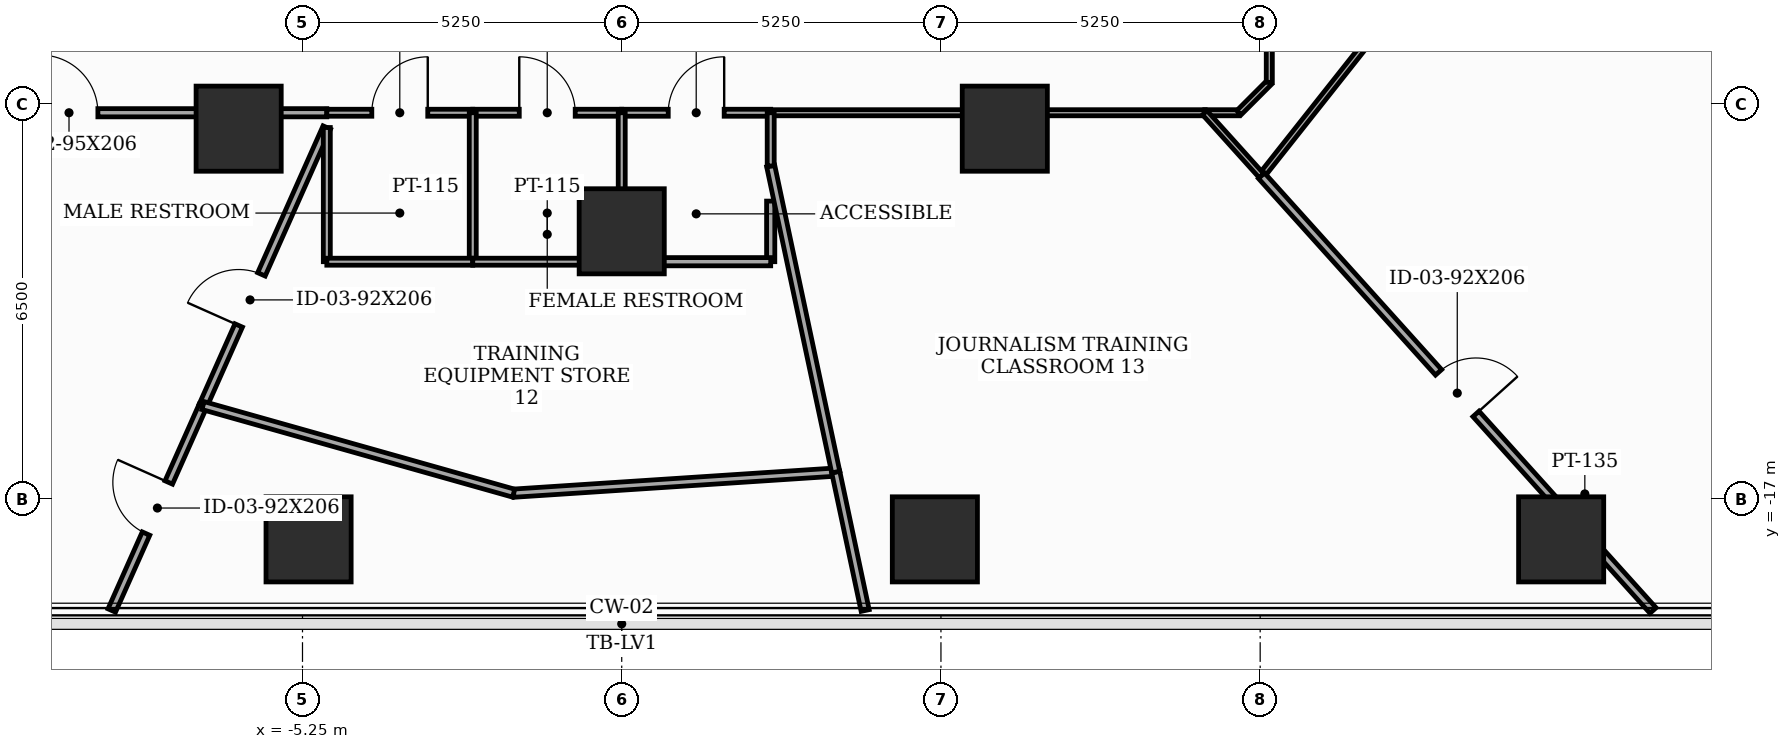
"""IFC4 building model, lengths in metres.
Left out: names, types, materials, properties, quantities, classifications, styles, units other than length and angle.
Written with IfcOpenShell. Run it as: python <this file> out.ifc"""

import sys

from ifc_helpers import new_model, si_unit, direction, frame, frame_2d, origin, origin_2d, place, context, subcontext, project, spatial, rectangle, extrude, element, fill, save


model = new_model("IFC4")
c1 = context("Model", 3, precision=1e-05, world=origin(), true_north=direction((0.0, 1.0)))
c2 = subcontext(c1, "Body", "Model", "MODEL_VIEW")
j1 = project(units=[si_unit("LENGTHUNIT", "METRE"), si_unit("PLANEANGLEUNIT", "RADIAN")], contexts=[c1])
p1 = place(None, origin())
s1 = spatial("IfcSite", under=j1, at=p1, CompositionType="ELEMENT")
p2 = place(p1, origin())
s2 = spatial("IfcBuilding", under=s1, at=p2, CompositionType="ELEMENT")
p3 = place(p2, frame((0.0, 0.0, 51.9)))
s3 = spatial("IfcBuildingStorey", under=s2, at=p3, CompositionType="ELEMENT", Elevation=51.9)
for number, where, z_axis, x_axis in (
    (1, (-6.3, -10.912, 0.0), (0.0, 0.0, 1.0), (1.0, 0.0, 0.0)),
    (2, (0.0, -12.6, 0.0), (0.0, 0.0, 1.0), (1.0, 0.0, 0.0)),
    (3, (6.3, -10.912, 0.0), (0.0, 0.0, 1.0), (1.0, 0.0, 0.0)),
    (4, (-5.15, -17.667, 0.0), (0.0, 0.0, 1.0), (1.0, 0.0, 0.0)),
    (5, (5.15, -17.667, 0.0), (0.0, 0.0, 1.0), (1.0, 0.0, 0.0)),
    (6, (15.45, -17.667, 0.0), (0.0, 0.0, 1.0), (1.0, 0.0, 0.0)),
):
    element("IfcColumn", number, at=place(p3, frame(where, z_axis=z_axis, x_axis=x_axis)), inside=s3, PredefinedType="COLUMN", context=c2, shape_type="SweptSolid", body=[
        extrude(rectangle(XDim=1.4, YDim=1.4, at=origin_2d()), origin(), (0.0, 0.0, 1.0), 3.7),
    ])
p4 = place(p3, frame((9.589, -10.65, 0.0), z_axis=(0.0, 0.0, 1.0), x_axis=(1.0, 0.0, 0.0)))
e7 = element("IfcWall", 7, at=p4, inside=s3, PredefinedType="MOVABLE", context=c2, shape_type="SweptSolid", body=[
    extrude(rectangle(XDim=0.561, YDim=0.1, at=frame_2d((0.28, 0.0))), origin(), (0.0, 0.0, 1.0), 3.5),
])
p5 = place(p3, frame((10.15, -10.65, 0.0), z_axis=(0.0, 0.0, 1.0), x_axis=(0.707106781187, 0.707106781187, 0.0)))
e8 = element("IfcWall", 8, at=p5, inside=s3, PredefinedType="MOVABLE", context=c2, shape_type="SweptSolid", body=[
    extrude(rectangle(XDim=0.707, YDim=0.1, at=frame_2d((0.354, 0.0))), origin(), (0.0, 0.0, 1.0), 2.085),
])
p6 = place(p3, frame((10.65, -10.15, 0.0), z_axis=(0.0, 0.0, 1.0), x_axis=(0.0, 1.0, 0.0)))
e9 = element("IfcWall", 9, at=p6, inside=s3, PredefinedType="MOVABLE", context=c2, shape_type="SweptSolid", body=[
    extrude(rectangle(XDim=6.158, YDim=0.1, at=frame_2d((3.079, 0.0))), origin(), (0.0, 0.0, 1.0), 2.085),
])
p7 = place(p6, frame((0.757, 0.0, 0.0)))
e10 = element("IfcOpeningElement", 10, at=p7, cuts=e9, PredefinedType="OPENING", context=c2, shape_type="SweptSolid", body=[
    extrude(rectangle(XDim=0.95, YDim=2.035, at=frame_2d((0.475, 1.018))), frame((0.0, 0.06, 0.0), z_axis=(0.0, -1.0, 0.0), x_axis=(1.0, 0.0, 0.0)), (0.0, 0.0, 1.0), 0.12),
])
p8 = place(p3, frame((-10.15, -10.65, 0.0), z_axis=(0.0, 0.0, 1.0), x_axis=(1.0, 0.0, 0.0)))
e11 = element("IfcWall", 11, at=p8, inside=s3, PredefinedType="PARTITIONING", context=c2, shape_type="SweptSolid", body=[
    extrude(rectangle(XDim=5.3, YDim=0.135, at=frame_2d((2.65, 0.0))), origin(), (0.0, 0.0, 1.0), 2.085),
])
p9 = place(p8, frame((0.585, 0.0, 0.0)))
e12 = element("IfcOpeningElement", 12, at=p9, cuts=e11, PredefinedType="OPENING", context=c2, shape_type="SweptSolid", body=[
    extrude(rectangle(XDim=0.95, YDim=2.035, at=frame_2d((0.475, 1.018))), frame((0.0, 0.077, 0.0), z_axis=(0.0, -1.0, 0.0), x_axis=(1.0, 0.0, 0.0)), (0.0, 0.0, 1.0), 0.155),
])
p10 = place(p3, frame((-4.85, -10.65, 0.0), z_axis=(0.0, 0.0, 1.0), x_axis=(1.0, 0.0, 0.0)))
e13 = element("IfcWall", 13, at=p10, inside=s3, PredefinedType="PARTITIONING", context=c2, shape_type="SweptSolid", body=[
    extrude(rectangle(XDim=2.4, YDim=0.115, at=frame_2d((1.2, 0.0))), origin(), (0.0, 0.0, 1.0), 3.5),
])
p11 = place(p10, frame((0.74, 0.0, 0.0)))
e14 = element("IfcOpeningElement", 14, at=p11, cuts=e13, PredefinedType="OPENING", context=c2, shape_type="SweptSolid", body=[
    extrude(rectangle(XDim=0.92, YDim=2.1, at=frame_2d((0.46, 1.05))), frame((0.0, 0.067, 0.0), z_axis=(0.0, -1.0, 0.0), x_axis=(1.0, 0.0, 0.0)), (0.0, 0.0, 1.0), 0.135),
])
p12 = place(p3, frame((-2.45, -10.65, 0.0), z_axis=(0.0, 0.0, 1.0), x_axis=(1.0, 0.0, 0.0)))
e15 = element("IfcWall", 15, at=p12, inside=s3, PredefinedType="PARTITIONING", context=c2, shape_type="SweptSolid", body=[
    extrude(rectangle(XDim=2.45, YDim=0.115, at=frame_2d((1.225, 0.0))), origin(), (0.0, 0.0, 1.0), 2.785),
])
p13 = place(p12, frame((0.765, 0.0, 0.0)))
e16 = element("IfcOpeningElement", 16, at=p13, cuts=e15, PredefinedType="OPENING", context=c2, shape_type="SweptSolid", body=[
    extrude(rectangle(XDim=0.92, YDim=2.1, at=frame_2d((0.46, 1.05))), frame((0.0, 0.067, 0.0), z_axis=(0.0, -1.0, 0.0), x_axis=(1.0, 0.0, 0.0)), (0.0, 0.0, 1.0), 0.135),
])
p14 = place(p3, frame((0.0, -10.65, 0.0), z_axis=(0.0, 0.0, 1.0), x_axis=(1.0, 0.0, 0.0)))
e17 = element("IfcWall", 17, at=p14, inside=s3, PredefinedType="PARTITIONING", context=c2, shape_type="SweptSolid", body=[
    extrude(rectangle(XDim=2.45, YDim=0.115, at=frame_2d((1.225, 0.0))), origin(), (0.0, 0.0, 1.0), 3.5),
])
p15 = place(p14, frame((0.765, 0.0, 0.0)))
e18 = element("IfcOpeningElement", 18, at=p15, cuts=e17, PredefinedType="OPENING", context=c2, shape_type="SweptSolid", body=[
    extrude(rectangle(XDim=0.92, YDim=2.1, at=frame_2d((0.46, 1.05))), frame((0.0, 0.067, 0.0), z_axis=(0.0, -1.0, 0.0), x_axis=(1.0, 0.0, 0.0)), (0.0, 0.0, 1.0), 0.135),
])
p16 = place(p3, frame((2.45, -10.65, 0.0), z_axis=(0.0, 0.0, 1.0), x_axis=(1.0, 0.0, 0.0)))
e19 = element("IfcWall", 19, at=p16, inside=s3, PredefinedType="MOVABLE", context=c2, shape_type="SweptSolid", body=[
    extrude(rectangle(XDim=7.139, YDim=0.1, at=frame_2d((3.57, 0.0))), origin(), (0.0, 0.0, 1.0), 2.085),
])
p17 = place(p3, frame((10.522, -11.686, 0.0), z_axis=(0.0, 0.0, 1.0), x_axis=(0.620628051287, 0.784105108997, 0.0)))
e20 = element("IfcWall", 20, at=p17, inside=s3, PredefinedType="MOVABLE", context=c2, shape_type="SweptSolid", body=[
    extrude(rectangle(XDim=5.678, YDim=0.1, at=frame_2d((2.839, 0.0))), origin(), (0.0, 0.0, 1.0), 2.085),
])
p18 = place(p3, frame((9.589, -10.65, 0.0), z_axis=(0.0, 0.0, 1.0), x_axis=(0.669100165698, -0.743172233243, 0.0)))
e21 = element("IfcWall", 21, at=p18, inside=s3, PredefinedType="MOVABLE", context=c2, shape_type="SweptSolid", body=[
    extrude(rectangle(XDim=1.394, YDim=0.1, at=frame_2d((0.697, 0.0))), origin(), (0.0, 0.0, 1.0), 3.5),
])
p19 = place(p3, frame((10.522, -11.686, 0.0), z_axis=(0.0, 0.0, 1.0), x_axis=(0.669132925935, -0.743142736915, 0.0)))
e22 = element("IfcWall", 22, at=p19, inside=s3, PredefinedType="PARTITIONING", context=c2, shape_type="SweptSolid", body=[
    extrude(rectangle(XDim=9.623, YDim=0.135, at=frame_2d((4.811, 0.0))), origin(), (0.0, 0.0, 1.0), 2.085),
])
p20 = place(p19, frame((4.351, 0.0, 0.0)))
e23 = element("IfcOpeningElement", 23, at=p20, cuts=e22, PredefinedType="OPENING", context=c2, shape_type="SweptSolid", body=[
    extrude(rectangle(XDim=0.92, YDim=2.035, at=frame_2d((0.46, 1.018))), frame((0.0, 0.077, 0.0), z_axis=(0.0, -1.0, 0.0), x_axis=(1.0, 0.0, 0.0)), (0.0, 0.0, 1.0), 0.155),
])
p21 = place(p3, frame((-8.387, -18.837, 0.0), z_axis=(0.0, 0.0, 1.0), x_axis=(0.406721597958, 0.913552156012, 0.0)))
e24 = element("IfcWall", 24, at=p21, inside=s3, PredefinedType="PARTITIONING", context=c2, shape_type="SweptSolid", body=[
    extrude(rectangle(XDim=3.69, YDim=0.135, at=frame_2d((1.845, 0.0))), origin(), (0.0, 0.0, 1.0), 2.085),
])
p22 = place(p21, frame((1.385, 0.0, 0.0)))
e25 = element("IfcOpeningElement", 25, at=p22, cuts=e24, PredefinedType="OPENING", context=c2, shape_type="SweptSolid", body=[
    extrude(rectangle(XDim=0.92, YDim=2.035, at=frame_2d((0.46, 1.018))), frame((0.0, 0.077, 0.0), z_axis=(0.0, -1.0, 0.0), x_axis=(1.0, 0.0, 0.0)), (0.0, 0.0, 1.0), 0.155),
])
p23 = place(p3, frame((-6.886, -15.466, 0.0), z_axis=(0.0, 0.0, 1.0), x_axis=(0.406713095633, 0.913555941276, 0.0)))
e26 = element("IfcWall", 26, at=p23, inside=s3, PredefinedType="PARTITIONING", context=c2, shape_type="SweptSolid", body=[
    extrude(rectangle(XDim=5.006, YDim=0.135, at=frame_2d((2.503, 0.0))), origin(), (0.0, 0.0, 1.0), 2.085),
])
p24 = place(p23, frame((1.442, 0.0, 0.0)))
e27 = element("IfcOpeningElement", 27, at=p24, cuts=e26, PredefinedType="OPENING", context=c2, shape_type="SweptSolid", body=[
    extrude(rectangle(XDim=0.92, YDim=2.035, at=frame_2d((0.46, 1.018))), frame((0.0, 0.077, 0.0), z_axis=(0.0, -1.0, 0.0), x_axis=(1.0, 0.0, 0.0)), (0.0, 0.0, 1.0), 0.155),
])
p25 = place(p3, frame((-2.45, -13.1, 0.0), z_axis=(0.0, 0.0, 1.0), x_axis=(0.0, 1.0, 0.0)))
e28 = element("IfcWall", 28, at=p25, inside=s3, PredefinedType="PARTITIONING", context=c2, shape_type="SweptSolid", body=[
    extrude(rectangle(XDim=2.45, YDim=0.115, at=frame_2d((1.225, 0.0))), origin(), (0.0, 0.0, 1.0), 2.785),
])
p26 = place(p3, frame((-4.85, -10.893, 0.0), z_axis=(0.0, 0.0, 1.0), x_axis=(0.0, -1.0, 0.0)))
e29 = element("IfcWall", 29, at=p26, inside=s3, PredefinedType="PARTITIONING", context=c2, shape_type="SweptSolid", body=[
    extrude(rectangle(XDim=2.207, YDim=0.115, at=frame_2d((1.104, 0.0))), origin(), (0.0, 0.0, 1.0), 2.085),
])
p27 = place(p3, frame((-4.85, -13.1, 0.0), z_axis=(0.0, 0.0, 1.0), x_axis=(1.0, 0.0, 0.0)))
e30 = element("IfcWall", 30, at=p27, inside=s3, PredefinedType="PARTITIONING", context=c2, shape_type="SweptSolid", body=[
    extrude(rectangle(XDim=2.4, YDim=0.115, at=frame_2d((1.2, 0.0))), origin(), (0.0, 0.0, 1.0), 2.085),
])
p28 = place(p3, frame((3.52, -16.56, 0.0), z_axis=(0.0, 0.0, 1.0), x_axis=(-0.99786221316, -0.065352915375, 0.0)))
e31 = element("IfcWall", 31, at=p28, inside=s3, PredefinedType="PARTITIONING", context=c2, shape_type="SweptSolid", body=[
    extrude(rectangle(XDim=5.308, YDim=0.135, at=frame_2d((2.654, 0.0))), origin(), (0.0, 0.0, 1.0), 2.085),
])
p29 = place(p3, frame((-1.777, -16.907, 0.0), z_axis=(0.0, 0.0, 1.0), x_axis=(-0.962452140865, 0.271451425757, 0.0)))
e32 = element("IfcWall", 32, at=p29, inside=s3, PredefinedType="PARTITIONING", context=c2, shape_type="SweptSolid", body=[
    extrude(rectangle(XDim=5.308, YDim=0.135, at=frame_2d((2.654, 0.0))), origin(), (0.0, 0.0, 1.0), 2.085),
])
p30 = place(p3, frame((4.003, -18.837, 0.0), z_axis=(0.0, 0.0, 1.0), x_axis=(-0.207680617925, 0.978196688268, 0.0)))
e33 = element("IfcWall", 33, at=p30, inside=s3, PredefinedType="PARTITIONING", context=c2, shape_type="SweptSolid", body=[
    extrude(rectangle(XDim=2.328, YDim=0.135, at=frame_2d((1.164, 0.0))), origin(), (0.0, 0.0, 1.0), 2.085),
])
p31 = place(p3, frame((-2.45, -13.1, 0.0), z_axis=(0.0, 0.0, 1.0), x_axis=(1.0, 0.0, 0.0)))
e34 = element("IfcWall", 34, at=p31, inside=s3, PredefinedType="PARTITIONING", context=c2, shape_type="SweptSolid", body=[
    extrude(rectangle(XDim=2.45, YDim=0.115, at=frame_2d((1.225, 0.0))), origin(), (0.0, 0.0, 1.0), 2.085),
])
p32 = place(p3, frame((0.0, -13.1, 0.0), z_axis=(0.0, 0.0, 1.0), x_axis=(0.0, 1.0, 0.0)))
e35 = element("IfcWall", 35, at=p32, inside=s3, PredefinedType="PARTITIONING", context=c2, shape_type="SweptSolid", body=[
    extrude(rectangle(XDim=2.45, YDim=0.115, at=frame_2d((1.225, 0.0))), origin(), (0.0, 0.0, 1.0), 2.085),
])
p33 = place(p3, frame((2.45, -12.103, 0.0), z_axis=(0.0, 0.0, 1.0), x_axis=(0.0, -1.0, 0.0)))
e36 = element("IfcWall", 36, at=p33, inside=s3, PredefinedType="PARTITIONING", context=c2, shape_type="SweptSolid", body=[
    extrude(rectangle(XDim=0.997, YDim=0.135, at=frame_2d((0.499, 0.0))), origin(), (0.0, 0.0, 1.0), 2.785),
])
p34 = place(p3, frame((2.45, -13.1, 0.0), z_axis=(0.0, 0.0, 1.0), x_axis=(-1.0, 0.0, 0.0)))
e37 = element("IfcWall", 37, at=p34, inside=s3, PredefinedType="PARTITIONING", context=c2, shape_type="SweptSolid", body=[
    extrude(rectangle(XDim=2.45, YDim=0.135, at=frame_2d((1.225, 0.0))), origin(), (0.0, 0.0, 1.0), 2.085),
])
p35 = place(p3, frame((3.52, -16.56, 0.0), z_axis=(0.0, 0.0, 1.0), x_axis=(-0.20791548957, 0.978146793276, 0.0)))
e38 = element("IfcWall", 38, at=p35, inside=s3, PredefinedType="PARTITIONING", context=c2, shape_type="SweptSolid", body=[
    extrude(rectangle(XDim=5.147, YDim=0.135, at=frame_2d((2.573, 0.0))), origin(), (0.0, 0.0, 1.0), 2.785),
])
p36 = place(p3, frame((2.45, -11.526, 0.0), z_axis=(0.0, 0.0, 1.0), x_axis=(0.0, 1.0, 0.0)))
e39 = element("IfcWall", 39, at=p36, inside=s3, PredefinedType="PARTITIONING", context=c2, shape_type="SweptSolid", body=[
    extrude(rectangle(XDim=0.876, YDim=0.115, at=frame_2d((0.438, 0.0))), origin(), (0.0, 0.0, 1.0), 3.5),
])
p37 = place(p9, origin())
e40 = element("IfcDoor", 40, at=p37, inside=s3, OperationType="SINGLE_SWING_LEFT", PredefinedType="DOOR", context=c2, shape_type="SweptSolid", body=[
    extrude(rectangle(XDim=0.95, YDim=2.035, at=frame_2d((0.475, 1.018))), frame((0.0, 0.025, 0.0), z_axis=(0.0, -1.0, 0.0), x_axis=(1.0, 0.0, 0.0)), (0.0, 0.0, 1.0), 0.05),
])
fill(e12, e40)
p38 = place(p11, origin())
e41 = element("IfcDoor", 41, at=p38, inside=s3, OperationType="SINGLE_SWING_RIGHT", PredefinedType="DOOR", context=c2, shape_type="SweptSolid", body=[
    extrude(rectangle(XDim=0.92, YDim=2.1, at=frame_2d((0.46, 1.05))), frame((0.0, 0.025, 0.0), z_axis=(0.0, -1.0, 0.0), x_axis=(1.0, 0.0, 0.0)), (0.0, 0.0, 1.0), 0.05),
])
fill(e14, e41)
p39 = place(p13, origin())
e42 = element("IfcDoor", 42, at=p39, inside=s3, OperationType="SINGLE_SWING_LEFT", PredefinedType="DOOR", context=c2, shape_type="SweptSolid", body=[
    extrude(rectangle(XDim=0.92, YDim=2.1, at=frame_2d((0.46, 1.05))), frame((0.0, 0.025, 0.0), z_axis=(0.0, -1.0, 0.0), x_axis=(1.0, 0.0, 0.0)), (0.0, 0.0, 1.0), 0.05),
])
fill(e16, e42)
p40 = place(p15, origin())
e43 = element("IfcDoor", 43, at=p40, inside=s3, OperationType="SINGLE_SWING_RIGHT", PredefinedType="DOOR", context=c2, shape_type="SweptSolid", body=[
    extrude(rectangle(XDim=0.92, YDim=2.1, at=frame_2d((0.46, 1.05))), frame((0.0, 0.025, 0.0), z_axis=(0.0, -1.0, 0.0), x_axis=(1.0, 0.0, 0.0)), (0.0, 0.0, 1.0), 0.05),
])
fill(e18, e43)
p41 = place(p20, origin())
e44 = element("IfcDoor", 44, at=p41, inside=s3, OperationType="SINGLE_SWING_RIGHT", PredefinedType="DOOR", context=c2, shape_type="SweptSolid", body=[
    extrude(rectangle(XDim=0.92, YDim=2.035, at=frame_2d((0.46, 1.018))), frame((0.0, 0.025, 0.0), z_axis=(0.0, -1.0, 0.0), x_axis=(1.0, 0.0, 0.0)), (0.0, 0.0, 1.0), 0.05),
])
fill(e23, e44)
p42 = place(p22, origin())
e45 = element("IfcDoor", 45, at=p42, inside=s3, OperationType="SINGLE_SWING_RIGHT", PredefinedType="DOOR", context=c2, shape_type="SweptSolid", body=[
    extrude(rectangle(XDim=0.92, YDim=2.035, at=frame_2d((0.46, 1.018))), frame((0.0, 0.025, 0.0), z_axis=(0.0, -1.0, 0.0), x_axis=(1.0, 0.0, 0.0)), (0.0, 0.0, 1.0), 0.05),
])
fill(e25, e45)
p43 = place(p24, origin())
e46 = element("IfcDoor", 46, at=p43, inside=s3, OperationType="SINGLE_SWING_LEFT", PredefinedType="DOOR", context=c2, shape_type="SweptSolid", body=[
    extrude(rectangle(XDim=0.92, YDim=2.035, at=frame_2d((0.46, 1.018))), frame((0.0, 0.025, 0.0), z_axis=(0.0, -1.0, 0.0), x_axis=(1.0, 0.0, 0.0)), (0.0, 0.0, 1.0), 0.05),
])
fill(e27, e46)
save(model, sys.argv[1])
